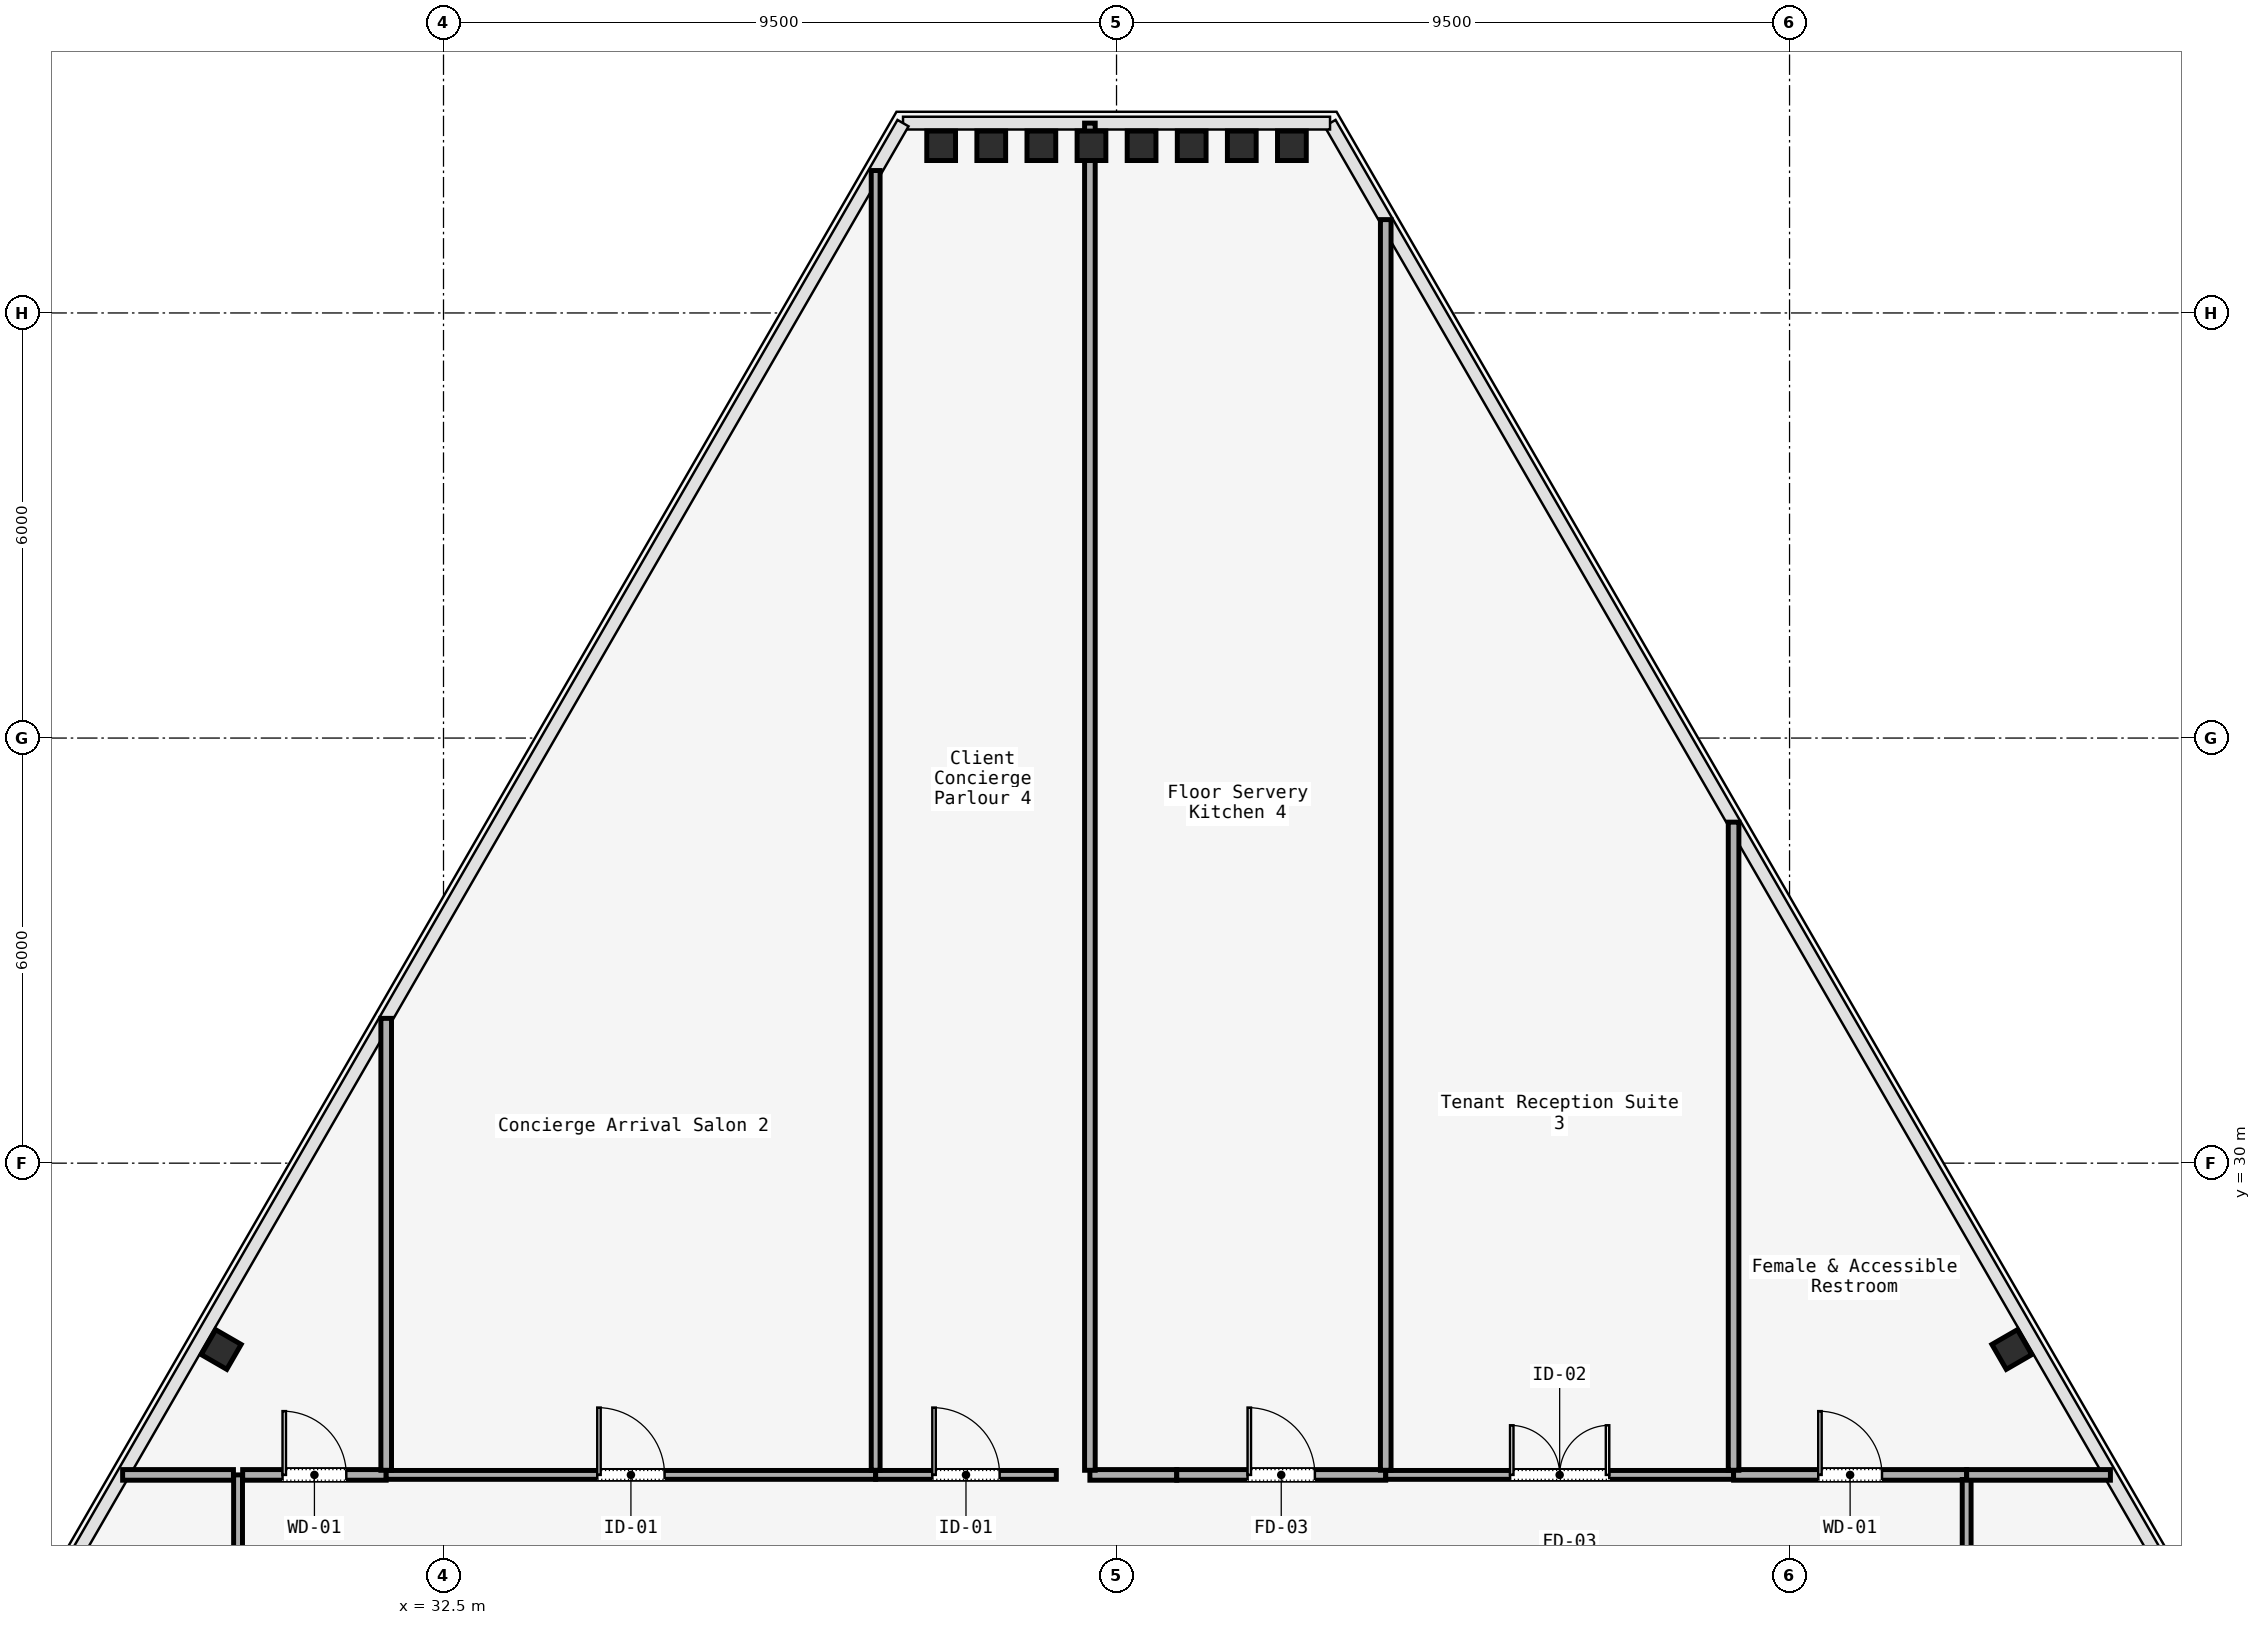
"""IFC4 building model, lengths in metres.
Left out: names, types, materials, properties, quantities, classifications, styles, units other than length and angle.
Written with IfcOpenShell. Run it as: python <this file> out.ifc"""

import sys

from ifc_helpers import new_model, si_unit, direction, frame, frame_2d, origin, origin_2d, place, context, subcontext, project, spatial, rectangle, i_section, extrude, element, fill, save


model = new_model("IFC4")
c1 = context("Model", 3, precision=1e-05, world=origin(), true_north=direction((0.0, 1.0)))
c2 = subcontext(c1, "Body", "Model", "MODEL_VIEW")
j1 = project(units=[si_unit("LENGTHUNIT", "METRE"), si_unit("PLANEANGLEUNIT", "RADIAN")], contexts=[c1])
p1 = place(None, origin())
s1 = spatial("IfcSite", under=j1, at=p1, CompositionType="ELEMENT")
p2 = place(p1, origin())
s2 = spatial("IfcBuilding", under=s1, at=p2, CompositionType="ELEMENT")
p3 = place(p2, frame((0.0, 0.0, 252.2)))
s3 = spatial("IfcBuildingStorey", under=s2, at=p3, CompositionType="ELEMENT", Elevation=252.2)
for number, where, z_axis, x_axis in (
    (1, (54.638, 27.37, 0.0), (0.0, 0.0, 1.0), (-0.5, 0.866, 0.0)),
    (2, (44.475, 44.36, 0.0), (0.0, 0.0, 1.0), (1.0, 0.0, 0.0)),
    (3, (43.768, 44.36, 0.0), (0.0, 0.0, 1.0), (1.0, 0.0, 0.0)),
    (4, (43.061, 44.36, 0.0), (0.0, 0.0, 1.0), (1.0, 0.0, 0.0)),
    (5, (42.354, 44.36, 0.0), (0.0, 0.0, 1.0), (1.0, 0.0, 0.0)),
    (6, (41.646, 44.36, 0.0), (0.0, 0.0, 1.0), (1.0, 0.0, 0.0)),
    (7, (40.939, 44.36, 0.0), (0.0, 0.0, 1.0), (1.0, 0.0, 0.0)),
    (8, (40.232, 44.36, 0.0), (0.0, 0.0, 1.0), (1.0, 0.0, 0.0)),
    (9, (39.525, 44.36, 0.0), (0.0, 0.0, 1.0), (1.0, 0.0, 0.0)),
    (10, (29.362, 27.37, 0.0), (0.0, 0.0, 1.0), (0.5, 0.866, 0.0)),
):
    element("IfcColumn", number, at=place(p3, frame(where, z_axis=z_axis, x_axis=x_axis)), inside=s3, PredefinedType="COLUMN", context=c2, shape_type="SweptSolid", body=[
        extrude(i_section(OverallWidth=0.406, OverallDepth=0.416, WebThickness=0.03, FlangeThickness=0.037, FilletRadius=0.015, at=origin_2d()), origin(), (0.0, 0.0, 1.0), 3.58),
    ])
p4 = place(p3, frame((29.6, 23.965, 0.0), z_axis=(0.0, 0.0, 1.0), x_axis=(0.0, 1.0, 0.0)))
e11 = element("IfcWall", 11, at=p4, inside=s3, PredefinedType="PARTITIONING", context=c2, shape_type="SweptSolid", body=[
    extrude(rectangle(XDim=1.635, YDim=0.125, at=frame_2d((0.817, 0.0))), origin(), (0.0, 0.0, 1.0), 3.01),
])
p5 = place(p3, frame((29.665, 25.6, 0.0), z_axis=(0.0, 0.0, 1.0), x_axis=(1.0, 0.0, 0.0)))
e12 = element("IfcWall", 12, at=p5, inside=s3, PredefinedType="PARTITIONING", context=c2, shape_type="SweptSolid", body=[
    extrude(rectangle(XDim=2.026, YDim=0.15, at=frame_2d((1.013, 0.0))), origin(), (0.0, 0.0, 1.0), 3.01),
])
p6 = place(p5, frame((0.563, 0.0, 0.0)))
e13 = element("IfcOpeningElement", 13, at=p6, cuts=e12, PredefinedType="OPENING", context=c2, shape_type="SweptSolid", body=[
    extrude(rectangle(XDim=0.9, YDim=2.15, at=frame_2d((0.45, 1.075))), frame((0.0, 0.075, 0.0), z_axis=(0.0, -1.0, 0.0), x_axis=(1.0, 0.0, 0.0)), (0.0, 0.0, 1.0), 0.15),
])
p7 = place(p3, frame((31.691, 25.6, 0.0), z_axis=(0.0, 0.0, 1.0), x_axis=(1.0, 0.0, 0.0)))
e14 = element("IfcWall", 14, at=p7, inside=s3, PredefinedType="PARTITIONING", context=c2, shape_type="SweptSolid", body=[
    extrude(rectangle(XDim=6.909, YDim=0.125, at=frame_2d((3.455, 0.0))), origin(), (0.0, 0.0, 1.0), 3.01),
])
p8 = place(p7, frame((2.979, 0.0, 0.0)))
e15 = element("IfcOpeningElement", 15, at=p8, cuts=e14, PredefinedType="OPENING", context=c2, shape_type="SweptSolid", body=[
    extrude(rectangle(XDim=0.95, YDim=2.2, at=frame_2d((0.475, 1.1))), frame((0.0, 0.062, 0.0), z_axis=(0.0, -1.0, 0.0), x_axis=(1.0, 0.0, 0.0)), (0.0, 0.0, 1.0), 0.125),
])
p9 = place(p3, frame((38.6, 25.6, 0.0), z_axis=(0.0, 0.0, 1.0), x_axis=(1.0, 0.0, 0.0)))
e16 = element("IfcWall", 16, at=p9, inside=s3, PredefinedType="PARTITIONING", context=c2, shape_type="SweptSolid", body=[
    extrude(rectangle(XDim=2.55, YDim=0.125, at=frame_2d((1.275, 0.0))), origin(), (0.0, 0.0, 1.0), 3.01),
])
p10 = place(p9, frame((0.8, 0.0, 0.0)))
e17 = element("IfcOpeningElement", 17, at=p10, cuts=e16, PredefinedType="OPENING", context=c2, shape_type="SweptSolid", body=[
    extrude(rectangle(XDim=0.95, YDim=2.2, at=frame_2d((0.475, 1.1))), frame((0.0, 0.062, 0.0), z_axis=(0.0, -1.0, 0.0), x_axis=(1.0, 0.0, 0.0)), (0.0, 0.0, 1.0), 0.125),
])
p11 = place(p3, frame((41.624, 25.6, 0.0), z_axis=(0.0, 0.0, 1.0), x_axis=(1.0, 0.0, 0.0)))
e18 = element("IfcWall", 18, at=p11, inside=s3, PredefinedType="PARTITIONING", context=c2, shape_type="SweptSolid", body=[
    extrude(rectangle(XDim=1.226, YDim=0.15, at=frame_2d((0.613, 0.0))), origin(), (0.0, 0.0, 1.0), 3.01),
])
p12 = place(p3, frame((42.85, 25.6, 0.0), z_axis=(0.0, 0.0, 1.0), x_axis=(1.0, 0.0, 0.0)))
e19 = element("IfcWall", 19, at=p12, inside=s3, PredefinedType="PARTITIONING", context=c2, shape_type="SweptSolid", body=[
    extrude(rectangle(XDim=2.95, YDim=0.15, at=frame_2d((1.475, 0.0))), origin(), (0.0, 0.0, 1.0), 3.01),
])
p13 = place(p12, frame((1.0, 0.0, 0.0)))
e20 = element("IfcOpeningElement", 20, at=p13, cuts=e19, PredefinedType="OPENING", context=c2, shape_type="SweptSolid", body=[
    extrude(rectangle(XDim=0.95, YDim=2.2, at=frame_2d((0.475, 1.1))), frame((0.0, 0.075, 0.0), z_axis=(0.0, -1.0, 0.0), x_axis=(1.0, 0.0, 0.0)), (0.0, 0.0, 1.0), 0.15),
])
p14 = place(p3, frame((45.8, 25.6, 0.0), z_axis=(0.0, 0.0, 1.0), x_axis=(1.0, 0.0, 0.0)))
e21 = element("IfcWall", 21, at=p14, inside=s3, PredefinedType="PARTITIONING", context=c2, shape_type="SweptSolid", body=[
    extrude(rectangle(XDim=4.91, YDim=0.125, at=frame_2d((2.455, 0.0))), origin(), (0.0, 0.0, 1.0), 3.01),
])
p15 = place(p14, frame((1.755, 0.0, 0.0)))
e22 = element("IfcOpeningElement", 22, at=p15, cuts=e21, PredefinedType="OPENING", context=c2, shape_type="SweptSolid", body=[
    extrude(rectangle(XDim=1.4, YDim=2.2, at=frame_2d((0.7, 1.1))), frame((0.0, 0.062, 0.0), z_axis=(0.0, -1.0, 0.0), x_axis=(1.0, 0.0, 0.0)), (0.0, 0.0, 1.0), 0.125),
])
p16 = place(p3, frame((50.71, 25.6, 0.0), z_axis=(0.0, 0.0, 1.0), x_axis=(1.0, 0.0, 0.0)))
e23 = element("IfcWall", 23, at=p16, inside=s3, PredefinedType="PARTITIONING", context=c2, shape_type="SweptSolid", body=[
    extrude(rectangle(XDim=3.29, YDim=0.15, at=frame_2d((1.645, 0.0))), origin(), (0.0, 0.0, 1.0), 3.01),
])
p17 = place(p16, frame((1.195, 0.0, 0.0)))
e24 = element("IfcOpeningElement", 24, at=p17, cuts=e23, PredefinedType="OPENING", context=c2, shape_type="SweptSolid", body=[
    extrude(rectangle(XDim=0.9, YDim=2.15, at=frame_2d((0.45, 1.075))), frame((0.0, 0.075, 0.0), z_axis=(0.0, -1.0, 0.0), x_axis=(1.0, 0.0, 0.0)), (0.0, 0.0, 1.0), 0.15),
])
p18 = place(p3, frame((54.0, 25.535, 0.0), z_axis=(0.0, 0.0, 1.0), x_axis=(0.0, -1.0, 0.0)))
e25 = element("IfcWall", 25, at=p18, inside=s3, PredefinedType="PARTITIONING", context=c2, shape_type="SweptSolid", body=[
    extrude(rectangle(XDim=1.635, YDim=0.125, at=frame_2d((0.817, 0.0))), origin(), (0.0, 0.0, 1.0), 3.01),
])
p19 = place(p3, frame((27.971, 25.6, 0.0), z_axis=(0.0, 0.0, 1.0), x_axis=(1.0, 0.0, 0.0)))
e26 = element("IfcWall", 26, at=p19, inside=s3, PredefinedType="PARTITIONING", context=c2, shape_type="SweptSolid", body=[
    extrude(rectangle(XDim=1.564, YDim=0.15, at=frame_2d((0.782, 0.0))), origin(), (0.0, 0.0, 1.0), 3.01),
])
p20 = place(p3, frame((54.0, 25.6, 0.0), z_axis=(0.0, 0.0, 1.0), x_axis=(1.0, 0.0, 0.0)))
e27 = element("IfcWall", 27, at=p20, inside=s3, PredefinedType="PARTITIONING", context=c2, shape_type="SweptSolid", body=[
    extrude(rectangle(XDim=2.029, YDim=0.15, at=frame_2d((1.015, 0.0))), origin(), (0.0, 0.0, 1.0), 3.01),
])
p21 = place(p3, frame((31.691, 32.044, 0.0), z_axis=(0.0, 0.0, 1.0), x_axis=(0.0, -1.0, 0.0)))
e28 = element("IfcWall", 28, at=p21, inside=s3, PredefinedType="PARTITIONING", context=c2, shape_type="SweptSolid", body=[
    extrude(rectangle(XDim=6.379, YDim=0.15, at=frame_2d((3.189, 0.0))), origin(), (0.0, 0.0, 1.0), 3.01),
])
p22 = place(p3, frame((50.71, 25.665, 0.0), z_axis=(0.0, 0.0, 1.0), x_axis=(0.0, 1.0, 0.0)))
e29 = element("IfcWall", 29, at=p22, inside=s3, PredefinedType="PARTITIONING", context=c2, shape_type="SweptSolid", body=[
    extrude(rectangle(XDim=9.148, YDim=0.15, at=frame_2d((4.574, 0.0))), origin(), (0.0, 0.0, 1.0), 3.01),
])
p23 = place(p3, frame((38.6, 44.01, 0.0), z_axis=(0.0, 0.0, 1.0), x_axis=(0.0, -1.0, 0.0)))
e30 = element("IfcWall", 30, at=p23, inside=s3, PredefinedType="PARTITIONING", context=c2, shape_type="SweptSolid", body=[
    extrude(rectangle(XDim=18.345, YDim=0.125, at=frame_2d((9.173, 0.0))), origin(), (0.0, 0.0, 1.0), 3.01),
])
p24 = place(p3, frame((45.8, 25.665, 0.0), z_axis=(0.0, 0.0, 1.0), x_axis=(0.0, 1.0, 0.0)))
e31 = element("IfcWall", 31, at=p24, inside=s3, PredefinedType="PARTITIONING", context=c2, shape_type="SweptSolid", body=[
    extrude(rectangle(XDim=17.653, YDim=0.15, at=frame_2d((8.826, 0.0))), origin(), (0.0, 0.0, 1.0), 3.01),
])
p25 = place(p3, frame((41.624, 25.665, 0.0), z_axis=(0.0, 0.0, 1.0), x_axis=(0.0, 1.0, 0.0)))
e32 = element("IfcWall", 32, at=p25, inside=s3, PredefinedType="PARTITIONING", context=c2, shape_type="SweptSolid", body=[
    extrude(rectangle(XDim=19.014, YDim=0.15, at=frame_2d((9.507, 0.0))), origin(), (0.0, 0.0, 1.0), 3.01),
])
p26 = place(p6, origin())
e33 = element("IfcDoor", 33, at=p26, inside=s3, OperationType="SINGLE_SWING_RIGHT", PredefinedType="DOOR", context=c2, shape_type="SweptSolid", body=[
    extrude(rectangle(XDim=0.9, YDim=2.15, at=frame_2d((0.45, 1.075))), frame((0.0, 0.025, 0.0), z_axis=(0.0, -1.0, 0.0), x_axis=(1.0, 0.0, 0.0)), (0.0, 0.0, 1.0), 0.05),
])
fill(e13, e33)
p27 = place(p17, origin())
e34 = element("IfcDoor", 34, at=p27, inside=s3, OperationType="SINGLE_SWING_LEFT", PredefinedType="DOOR", context=c2, shape_type="SweptSolid", body=[
    extrude(rectangle(XDim=0.9, YDim=2.15, at=frame_2d((0.45, 1.075))), frame((0.0, 0.025, 0.0), z_axis=(0.0, -1.0, 0.0), x_axis=(1.0, 0.0, 0.0)), (0.0, 0.0, 1.0), 0.05),
])
fill(e24, e34)
p28 = place(p8, origin())
e35 = element("IfcDoor", 35, at=p28, inside=s3, OperationType="SINGLE_SWING_RIGHT", PredefinedType="DOOR", context=c2, shape_type="SweptSolid", body=[
    extrude(rectangle(XDim=0.95, YDim=2.2, at=frame_2d((0.475, 1.1))), frame((0.0, 0.025, 0.0), z_axis=(0.0, -1.0, 0.0), x_axis=(1.0, 0.0, 0.0)), (0.0, 0.0, 1.0), 0.05),
])
fill(e15, e35)
p29 = place(p15, origin())
e36 = element("IfcDoor", 36, at=p29, inside=s3, OperationType="SINGLE_SWING_LEFT", PredefinedType="DOOR", context=c2, shape_type="SweptSolid", body=[
    extrude(rectangle(XDim=1.4, YDim=2.2, at=frame_2d((0.7, 1.1))), frame((0.0, 0.025, 0.0), z_axis=(0.0, -1.0, 0.0), x_axis=(1.0, 0.0, 0.0)), (0.0, 0.0, 1.0), 0.05),
])
fill(e22, e36)
p30 = place(p13, origin())
e37 = element("IfcDoor", 37, at=p30, inside=s3, OperationType="SINGLE_SWING_RIGHT", PredefinedType="DOOR", context=c2, shape_type="SweptSolid", body=[
    extrude(rectangle(XDim=0.95, YDim=2.2, at=frame_2d((0.475, 1.1))), frame((0.0, 0.025, 0.0), z_axis=(0.0, -1.0, 0.0), x_axis=(1.0, 0.0, 0.0)), (0.0, 0.0, 1.0), 0.05),
])
fill(e20, e37)
p31 = place(p10, origin())
e38 = element("IfcDoor", 38, at=p31, inside=s3, OperationType="SINGLE_SWING_LEFT", PredefinedType="DOOR", context=c2, shape_type="SweptSolid", body=[
    extrude(rectangle(XDim=0.95, YDim=2.2, at=frame_2d((0.475, 1.1))), frame((0.0, 0.025, 0.0), z_axis=(0.0, -1.0, 0.0), x_axis=(1.0, 0.0, 0.0)), (0.0, 0.0, 1.0), 0.05),
])
fill(e17, e38)
save(model, sys.argv[1])
